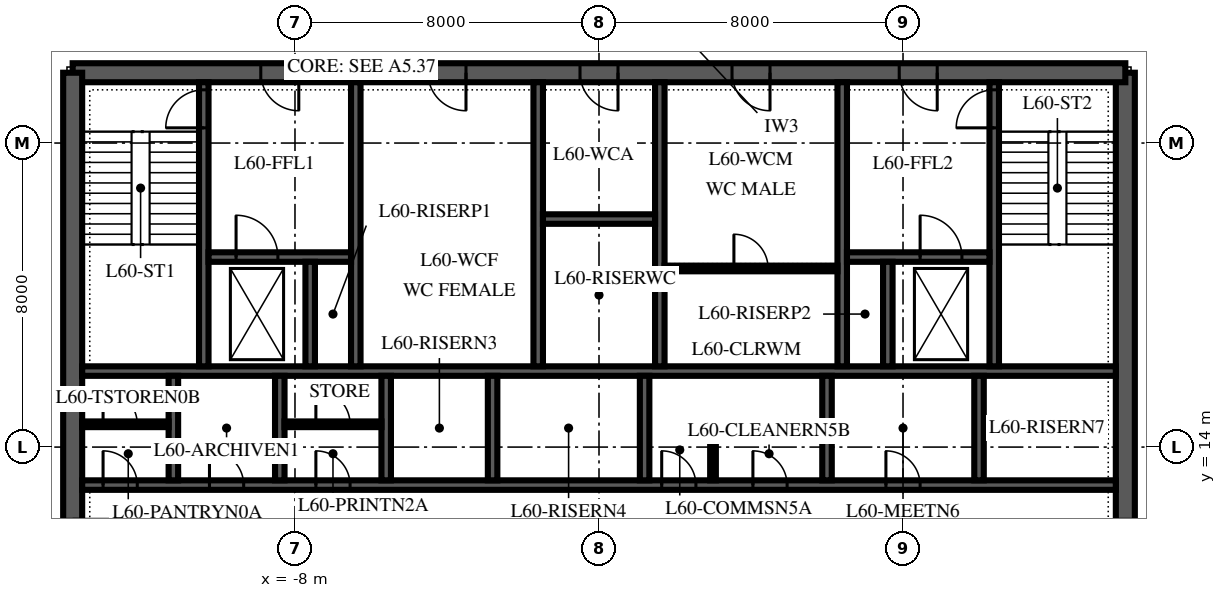
"""IFC4 building model, lengths in metres.
Left out: names, types, materials, properties, quantities, classifications, styles, units other than length and angle.
Written with IfcOpenShell. Run it as: python <this file> out.ifc"""

import sys

from ifc_helpers import new_model, si_unit, direction, frame, frame_2d, origin, place, context, subcontext, project, spatial, polyline, rectangle, outline, extrude, element, fill, save


model = new_model("IFC4")
c1 = context("Model", 3, precision=1e-05, world=origin(), true_north=direction((0.0, 1.0)))
c2 = subcontext(c1, "Body", "Model", "MODEL_VIEW")
j1 = project(units=[si_unit("LENGTHUNIT", "METRE"), si_unit("PLANEANGLEUNIT", "RADIAN")], contexts=[c1])
p1 = place(None, origin())
s1 = spatial("IfcSite", under=j1, at=p1, CompositionType="ELEMENT")
p2 = place(p1, origin())
s2 = spatial("IfcBuilding", under=s1, at=p2, CompositionType="ELEMENT")
p3 = place(p2, frame((0.0, 0.0, 260.0)))
s3 = spatial("IfcBuildingStorey", under=s2, at=p3, CompositionType="ELEMENT", Elevation=260.0)
p4 = place(p3, frame((13.85, 6.15, 0.0), z_axis=(0.0, 0.0, 1.0), x_axis=(0.0, 1.0, 0.0)))
e1 = element("IfcWall", 1, at=p4, inside=s3, PredefinedType="SHEAR", context=c2, shape_type="SweptSolid", body=[
    extrude(outline(polyline([(0.0, -0.25), (17.7, -0.25), (17.7, 0.0), (17.45, 0.0), (17.45, 0.25), (0.25, 0.25), (0.25, 0.0), (0.0, 0.0), (0.0, -0.25)])), origin(), (0.0, 0.0, 1.0), 4.0),
])
p5 = place(p4, frame((4.15, 0.0, 0.0)))
e2 = element("IfcOpeningElement", 2, at=p5, cuts=e1, PredefinedType="OPENING", context=c2, shape_type="SweptSolid", body=[
    extrude(rectangle(XDim=1.8, YDim=2.4, at=frame_2d((0.9, 1.2))), frame((0.0, 0.265, 0.0), z_axis=(0.0, -1.0, 0.0), x_axis=(1.0, 0.0, 0.0)), (0.0, 0.0, 1.0), 0.53),
])
p6 = place(p3, frame((13.85, 23.85, 0.0), z_axis=(0.0, 0.0, 1.0), x_axis=(-1.0, 0.0, 0.0)))
e3 = element("IfcWall", 3, at=p6, inside=s3, PredefinedType="SHEAR", context=c2, shape_type="SweptSolid", body=[
    extrude(rectangle(XDim=27.7, YDim=0.5, at=frame_2d((13.85, 0.0))), origin(), (0.0, 0.0, 1.0), 4.0),
])
p7 = place(p6, frame((21.75, 0.0, 0.0)))
e4 = element("IfcOpeningElement", 4, at=p7, cuts=e3, PredefinedType="OPENING", context=c2, shape_type="SweptSolid", body=[
    extrude(rectangle(XDim=1.0, YDim=2.1, at=frame_2d((0.5, 1.05))), frame((0.0, 0.265, 0.0), z_axis=(0.0, -1.0, 0.0), x_axis=(1.0, 0.0, 0.0)), (0.0, 0.0, 1.0), 0.53),
])
p8 = place(p6, frame((4.95, 0.0, 0.0)))
e5 = element("IfcOpeningElement", 5, at=p8, cuts=e3, PredefinedType="OPENING", context=c2, shape_type="SweptSolid", body=[
    extrude(rectangle(XDim=1.0, YDim=2.1, at=frame_2d((0.5, 1.05))), frame((0.0, 0.265, 0.0), z_axis=(0.0, -1.0, 0.0), x_axis=(1.0, 0.0, 0.0)), (0.0, 0.0, 1.0), 0.53),
])
p9 = place(p6, frame((17.35, 0.0, 0.0)))
e6 = element("IfcOpeningElement", 6, at=p9, cuts=e3, PredefinedType="OPENING", context=c2, shape_type="SweptSolid", body=[
    extrude(rectangle(XDim=1.0, YDim=2.1, at=frame_2d((0.5, 1.05))), frame((0.0, 0.265, 0.0), z_axis=(0.0, -1.0, 0.0), x_axis=(1.0, 0.0, 0.0)), (0.0, 0.0, 1.0), 0.53),
])
p10 = place(p6, frame((13.35, 0.0, 0.0)))
e7 = element("IfcOpeningElement", 7, at=p10, cuts=e3, PredefinedType="OPENING", context=c2, shape_type="SweptSolid", body=[
    extrude(rectangle(XDim=1.0, YDim=2.1, at=frame_2d((0.5, 1.05))), frame((0.0, 0.265, 0.0), z_axis=(0.0, -1.0, 0.0), x_axis=(1.0, 0.0, 0.0)), (0.0, 0.0, 1.0), 0.53),
])
p11 = place(p6, frame((9.35, 0.0, 0.0)))
e8 = element("IfcOpeningElement", 8, at=p11, cuts=e3, PredefinedType="OPENING", context=c2, shape_type="SweptSolid", body=[
    extrude(rectangle(XDim=1.0, YDim=2.1, at=frame_2d((0.5, 1.05))), frame((0.0, 0.265, 0.0), z_axis=(0.0, -1.0, 0.0), x_axis=(1.0, 0.0, 0.0)), (0.0, 0.0, 1.0), 0.53),
])
p12 = place(p3, frame((-13.85, 23.85, 0.0), z_axis=(0.0, 0.0, 1.0), x_axis=(0.0, -1.0, 0.0)))
e9 = element("IfcWall", 9, at=p12, inside=s3, PredefinedType="SHEAR", context=c2, shape_type="SweptSolid", body=[
    extrude(outline(polyline([(0.0, -0.25), (17.7, -0.25), (17.7, 0.0), (17.45, 0.0), (17.45, 0.25), (0.25, 0.25), (0.25, 0.0), (0.0, 0.0), (0.0, -0.25)])), origin(), (0.0, 0.0, 1.0), 4.0),
])
p13 = place(p12, frame((11.75, 0.0, 0.0)))
e10 = element("IfcOpeningElement", 10, at=p13, cuts=e9, PredefinedType="OPENING", context=c2, shape_type="SweptSolid", body=[
    extrude(rectangle(XDim=1.8, YDim=2.4, at=frame_2d((0.9, 1.2))), frame((0.0, 0.265, 0.0), z_axis=(0.0, -1.0, 0.0), x_axis=(1.0, 0.0, 0.0)), (0.0, 0.0, 1.0), 0.53),
])
p14 = place(p3, frame((-13.6, 13.0, 0.0), z_axis=(0.0, 0.0, 1.0), x_axis=(1.0, 0.0, 0.0)))
e11 = element("IfcWall", 11, at=p14, inside=s3, PredefinedType="SHEAR", context=c2, shape_type="SweptSolid", body=[
    extrude(rectangle(XDim=27.2, YDim=0.25, at=frame_2d((13.6, 0.0))), origin(), (0.0, 0.0, 1.0), 4.0),
])
p15 = place(p14, frame((15.25, 0.0, 0.0)))
e12 = element("IfcOpeningElement", 12, at=p15, cuts=e11, PredefinedType="OPENING", context=c2, shape_type="SweptSolid", body=[
    extrude(rectangle(XDim=0.9, YDim=2.1, at=frame_2d((0.45, 1.05))), frame((0.0, 0.14, 0.0), z_axis=(0.0, -1.0, 0.0), x_axis=(1.0, 0.0, 0.0)), (0.0, 0.0, 1.0), 0.28),
])
p16 = place(p14, frame((17.65, 0.0, 0.0)))
e13 = element("IfcOpeningElement", 13, at=p16, cuts=e11, PredefinedType="OPENING", context=c2, shape_type="SweptSolid", body=[
    extrude(rectangle(XDim=0.9, YDim=2.1, at=frame_2d((0.45, 1.05))), frame((0.0, 0.14, 0.0), z_axis=(0.0, -1.0, 0.0), x_axis=(1.0, 0.0, 0.0)), (0.0, 0.0, 1.0), 0.28),
])
p17 = place(p14, frame((21.15, 0.0, 0.0)))
e14 = element("IfcOpeningElement", 14, at=p17, cuts=e11, PredefinedType="OPENING", context=c2, shape_type="SweptSolid", body=[
    extrude(rectangle(XDim=0.9, YDim=2.1, at=frame_2d((0.45, 1.05))), frame((0.0, 0.14, 0.0), z_axis=(0.0, -1.0, 0.0), x_axis=(1.0, 0.0, 0.0)), (0.0, 0.0, 1.0), 0.28),
])
p18 = place(p14, frame((0.55, 0.0, 0.0)))
e15 = element("IfcOpeningElement", 15, at=p18, cuts=e11, PredefinedType="OPENING", context=c2, shape_type="SweptSolid", body=[
    extrude(rectangle(XDim=0.9, YDim=2.1, at=frame_2d((0.45, 1.05))), frame((0.0, 0.14, 0.0), z_axis=(0.0, -1.0, 0.0), x_axis=(1.0, 0.0, 0.0)), (0.0, 0.0, 1.0), 0.28),
])
p19 = place(p14, frame((3.35, 0.0, 0.0)))
e16 = element("IfcOpeningElement", 16, at=p19, cuts=e11, PredefinedType="OPENING", context=c2, shape_type="SweptSolid", body=[
    extrude(rectangle(XDim=0.9, YDim=2.1, at=frame_2d((0.45, 1.05))), frame((0.0, 0.14, 0.0), z_axis=(0.0, -1.0, 0.0), x_axis=(1.0, 0.0, 0.0)), (0.0, 0.0, 1.0), 0.28),
])
p20 = place(p14, frame((6.15, 0.0, 0.0)))
e17 = element("IfcOpeningElement", 17, at=p20, cuts=e11, PredefinedType="OPENING", context=c2, shape_type="SweptSolid", body=[
    extrude(rectangle(XDim=0.9, YDim=2.1, at=frame_2d((0.45, 1.05))), frame((0.0, 0.14, 0.0), z_axis=(0.0, -1.0, 0.0), x_axis=(1.0, 0.0, 0.0)), (0.0, 0.0, 1.0), 0.28),
])
p21 = place(p3, frame((-13.6, 16.0, 0.0), z_axis=(0.0, 0.0, 1.0), x_axis=(1.0, 0.0, 0.0)))
e18 = element("IfcWall", 18, at=p21, inside=s3, PredefinedType="SHEAR", context=c2, shape_type="SweptSolid", body=[
    extrude(rectangle(XDim=27.2, YDim=0.25, at=frame_2d((13.6, 0.0))), origin(), (0.0, 0.0, 1.0), 4.0),
])
for number, where, z_axis, x_axis in (
    (19, (-11.2, 13.125, 0.0), (0.0, 0.0, 1.0), (0.0, 1.0, 0.0)),
    (20, (-8.4, 13.125, 0.0), (0.0, 0.0, 1.0), (0.0, 1.0, 0.0)),
    (21, (-5.6, 13.125, 0.0), (0.0, 0.0, 1.0), (0.0, 1.0, 0.0)),
    (22, (-2.8, 13.125, 0.0), (0.0, 0.0, 1.0), (0.0, 1.0, 0.0)),
    (23, (1.2, 13.125, 0.0), (0.0, 0.0, 1.0), (0.0, 1.0, 0.0)),
    (24, (6.0, 13.125, 0.0), (0.0, 0.0, 1.0), (0.0, 1.0, 0.0)),
    (25, (10.0, 13.125, 0.0), (0.0, 0.0, 1.0), (0.0, 1.0, 0.0)),
):
    element("IfcWall", number, at=place(p3, frame(where, z_axis=z_axis, x_axis=x_axis)), inside=s3, PredefinedType="SHEAR", context=c2, shape_type="SweptSolid", body=[
        extrude(rectangle(XDim=2.75, YDim=0.25, at=frame_2d((1.375, 0.0))), origin(), (0.0, 0.0, 1.0), 4.0),
    ])
p22 = place(p3, frame((-10.4, 16.125, 0.0), z_axis=(0.0, 0.0, 1.0), x_axis=(0.0, 1.0, 0.0)))
e26 = element("IfcWall", 26, at=p22, inside=s3, PredefinedType="SHEAR", context=c2, shape_type="SweptSolid", body=[
    extrude(rectangle(XDim=7.475, YDim=0.25, at=frame_2d((3.738, 0.0))), origin(), (0.0, 0.0, 1.0), 4.0),
])
p23 = place(p22, frame((6.275, 0.0, 0.0)))
e27 = element("IfcOpeningElement", 27, at=p23, cuts=e26, PredefinedType="OPENING", context=c2, shape_type="SweptSolid", body=[
    extrude(rectangle(XDim=1.0, YDim=2.1, at=frame_2d((0.5, 1.05))), frame((0.0, 0.14, 0.0), z_axis=(0.0, -1.0, 0.0), x_axis=(1.0, 0.0, 0.0)), (0.0, 0.0, 1.0), 0.28),
])
for number, where, z_axis, x_axis in (
    (28, (-6.4, 16.125, 0.0), (0.0, 0.0, 1.0), (0.0, 1.0, 0.0)),
    (29, (-1.6, 16.125, 0.0), (0.0, 0.0, 1.0), (0.0, 1.0, 0.0)),
    (30, (1.6, 16.125, 0.0), (0.0, 0.0, 1.0), (0.0, 1.0, 0.0)),
    (31, (6.4, 16.125, 0.0), (0.0, 0.0, 1.0), (0.0, 1.0, 0.0)),
):
    element("IfcWall", number, at=place(p3, frame(where, z_axis=z_axis, x_axis=x_axis)), inside=s3, PredefinedType="SHEAR", context=c2, shape_type="SweptSolid", body=[
        extrude(rectangle(XDim=7.475, YDim=0.25, at=frame_2d((3.738, 0.0))), origin(), (0.0, 0.0, 1.0), 4.0),
    ])
p24 = place(p3, frame((10.4, 16.125, 0.0), z_axis=(0.0, 0.0, 1.0), x_axis=(0.0, 1.0, 0.0)))
e32 = element("IfcWall", 32, at=p24, inside=s3, PredefinedType="SHEAR", context=c2, shape_type="SweptSolid", body=[
    extrude(rectangle(XDim=7.475, YDim=0.25, at=frame_2d((3.738, 0.0))), origin(), (0.0, 0.0, 1.0), 4.0),
])
p25 = place(p24, frame((6.275, 0.0, 0.0)))
e33 = element("IfcOpeningElement", 33, at=p25, cuts=e32, PredefinedType="OPENING", context=c2, shape_type="SweptSolid", body=[
    extrude(rectangle(XDim=1.0, YDim=2.1, at=frame_2d((0.5, 1.05))), frame((0.0, 0.14, 0.0), z_axis=(0.0, -1.0, 0.0), x_axis=(1.0, 0.0, 0.0)), (0.0, 0.0, 1.0), 0.28),
])
p26 = place(p3, frame((-10.275, 19.0, 0.0), z_axis=(0.0, 0.0, 1.0), x_axis=(1.0, 0.0, 0.0)))
e34 = element("IfcWall", 34, at=p26, inside=s3, PredefinedType="SHEAR", context=c2, shape_type="SweptSolid", body=[
    extrude(rectangle(XDim=3.75, YDim=0.25, at=frame_2d((1.875, 0.0))), origin(), (0.0, 0.0, 1.0), 4.0),
])
p27 = place(p26, frame((0.725, 0.0, 0.0)))
e35 = element("IfcOpeningElement", 35, at=p27, cuts=e34, PredefinedType="OPENING", context=c2, shape_type="SweptSolid", body=[
    extrude(rectangle(XDim=1.1, YDim=2.1, at=frame_2d((0.55, 1.05))), frame((0.0, 0.14, 0.0), z_axis=(0.0, -1.0, 0.0), x_axis=(1.0, 0.0, 0.0)), (0.0, 0.0, 1.0), 0.28),
])
p28 = place(p3, frame((6.525, 19.0, 0.0), z_axis=(0.0, 0.0, 1.0), x_axis=(1.0, 0.0, 0.0)))
e36 = element("IfcWall", 36, at=p28, inside=s3, PredefinedType="SHEAR", context=c2, shape_type="SweptSolid", body=[
    extrude(rectangle(XDim=3.75, YDim=0.25, at=frame_2d((1.875, 0.0))), origin(), (0.0, 0.0, 1.0), 4.0),
])
p29 = place(p28, frame((1.925, 0.0, 0.0)))
e37 = element("IfcOpeningElement", 37, at=p29, cuts=e36, PredefinedType="OPENING", context=c2, shape_type="SweptSolid", body=[
    extrude(rectangle(XDim=1.1, YDim=2.1, at=frame_2d((0.55, 1.05))), frame((0.0, 0.14, 0.0), z_axis=(0.0, -1.0, 0.0), x_axis=(1.0, 0.0, 0.0)), (0.0, 0.0, 1.0), 0.28),
])
for number, where, z_axis, x_axis in (
    (38, (-7.6, 16.125, 0.0), (0.0, 0.0, 1.0), (0.0, 1.0, 0.0)),
    (39, (7.6, 16.125, 0.0), (0.0, 0.0, 1.0), (0.0, 1.0, 0.0)),
):
    element("IfcWall", number, at=place(p3, frame(where, z_axis=z_axis, x_axis=x_axis)), inside=s3, PredefinedType="SHEAR", context=c2, shape_type="SweptSolid", body=[
        extrude(rectangle(XDim=2.75, YDim=0.25, at=frame_2d((1.375, 0.0))), origin(), (0.0, 0.0, 1.0), 4.0),
    ])
p30 = place(p3, frame((-1.475, 20.0, 0.0), z_axis=(0.0, 0.0, 1.0), x_axis=(1.0, 0.0, 0.0)))
e40 = element("IfcWall", 40, at=p30, inside=s3, PredefinedType="SHEAR", context=c2, shape_type="SweptSolid", body=[
    extrude(rectangle(XDim=2.95, YDim=0.25, at=frame_2d((1.475, 0.0))), origin(), (0.0, 0.0, 1.0), 4.0),
])
p31 = place(p3, frame((1.725, 18.7, 0.0), z_axis=(0.0, 0.0, 1.0), x_axis=(1.0, 0.0, 0.0)))
e41 = element("IfcWall", 41, at=p31, inside=s3, PredefinedType="PARTITIONING", context=c2, shape_type="SweptSolid", body=[
    extrude(rectangle(XDim=4.55, YDim=0.15, at=frame_2d((2.275, 0.0))), origin(), (0.0, 0.0, 1.0), 3.85),
])
p32 = place(p31, frame((1.825, 0.0, 0.0)))
e42 = element("IfcOpeningElement", 42, at=p32, cuts=e41, PredefinedType="OPENING", context=c2, shape_type="SweptSolid", body=[
    extrude(rectangle(XDim=0.9, YDim=2.1, at=frame_2d((0.45, 1.05))), frame((0.0, 0.09, 0.0), z_axis=(0.0, -1.0, 0.0), x_axis=(1.0, 0.0, 0.0)), (0.0, 0.0, 1.0), 0.18),
])
p33 = place(p3, frame((3.0, 13.125, 0.0), z_axis=(0.0, 0.0, 1.0), x_axis=(0.0, 1.0, 0.0)))
e43 = element("IfcWall", 43, at=p33, inside=s3, PredefinedType="PARTITIONING", context=c2, shape_type="SweptSolid", body=[
    extrude(rectangle(XDim=1.55, YDim=0.15, at=frame_2d((0.775, 0.0))), origin(), (0.0, 0.0, 1.0), 3.85),
])
p34 = place(p3, frame((3.075, 14.6, 0.0), z_axis=(0.0, 0.0, 1.0), x_axis=(1.0, 0.0, 0.0)))
e44 = element("IfcWall", 44, at=p34, inside=s3, PredefinedType="PARTITIONING", context=c2, shape_type="SweptSolid", body=[
    extrude(rectangle(XDim=2.8, YDim=0.15, at=frame_2d((1.4, 0.0))), origin(), (0.0, 0.0, 1.0), 3.85),
])
p35 = place(p3, frame((-13.6, 14.6, 0.0), z_axis=(0.0, 0.0, 1.0), x_axis=(1.0, 0.0, 0.0)))
e45 = element("IfcWall", 45, at=p35, inside=s3, PredefinedType="PARTITIONING", context=c2, shape_type="SweptSolid", body=[
    extrude(rectangle(XDim=2.275, YDim=0.15, at=frame_2d((1.138, 0.0))), origin(), (0.0, 0.0, 1.0), 3.85),
])
p36 = place(p35, frame((0.55, 0.0, 0.0)))
e46 = element("IfcOpeningElement", 46, at=p36, cuts=e45, PredefinedType="OPENING", context=c2, shape_type="SweptSolid", body=[
    extrude(rectangle(XDim=0.9, YDim=2.1, at=frame_2d((0.45, 1.05))), frame((0.0, 0.09, 0.0), z_axis=(0.0, -1.0, 0.0), x_axis=(1.0, 0.0, 0.0)), (0.0, 0.0, 1.0), 0.18),
])
p37 = place(p3, frame((-8.275, 14.6, 0.0), z_axis=(0.0, 0.0, 1.0), x_axis=(1.0, 0.0, 0.0)))
e47 = element("IfcWall", 47, at=p37, inside=s3, PredefinedType="PARTITIONING", context=c2, shape_type="SweptSolid", body=[
    extrude(rectangle(XDim=2.55, YDim=0.15, at=frame_2d((1.275, 0.0))), origin(), (0.0, 0.0, 1.0), 3.85),
])
p38 = place(p37, frame((0.825, 0.0, 0.0)))
e48 = element("IfcOpeningElement", 48, at=p38, cuts=e47, PredefinedType="OPENING", context=c2, shape_type="SweptSolid", body=[
    extrude(rectangle(XDim=0.9, YDim=2.1, at=frame_2d((0.45, 1.05))), frame((0.0, 0.09, 0.0), z_axis=(0.0, -1.0, 0.0), x_axis=(1.0, 0.0, 0.0)), (0.0, 0.0, 1.0), 0.18),
])
p39 = place(p7, origin())
e49 = element("IfcDoor", 49, at=p39, inside=s3, OperationType="SINGLE_SWING_RIGHT", PredefinedType="DOOR", context=c2, shape_type="SweptSolid", body=[
    extrude(rectangle(XDim=1.0, YDim=2.1, at=frame_2d((0.5, 1.05))), frame((0.0, 0.25, 0.0), z_axis=(0.0, -1.0, 0.0), x_axis=(1.0, 0.0, 0.0)), (0.0, 0.0, 1.0), 0.5),
])
fill(e4, e49)
p40 = place(p8, origin())
e50 = element("IfcDoor", 50, at=p40, inside=s3, OperationType="SINGLE_SWING_RIGHT", PredefinedType="DOOR", context=c2, shape_type="SweptSolid", body=[
    extrude(rectangle(XDim=1.0, YDim=2.1, at=frame_2d((0.5, 1.05))), frame((0.0, 0.25, 0.0), z_axis=(0.0, -1.0, 0.0), x_axis=(1.0, 0.0, 0.0)), (0.0, 0.0, 1.0), 0.5),
])
fill(e5, e50)
p41 = place(p9, origin())
e51 = element("IfcDoor", 51, at=p41, inside=s3, OperationType="SINGLE_SWING_LEFT", PredefinedType="DOOR", context=c2, shape_type="SweptSolid", body=[
    extrude(rectangle(XDim=1.0, YDim=2.1, at=frame_2d((0.5, 1.05))), frame((0.0, 0.25, 0.0), z_axis=(0.0, -1.0, 0.0), x_axis=(1.0, 0.0, 0.0)), (0.0, 0.0, 1.0), 0.5),
])
fill(e6, e51)
p42 = place(p10, origin())
e52 = element("IfcDoor", 52, at=p42, inside=s3, OperationType="SINGLE_SWING_LEFT", PredefinedType="DOOR", context=c2, shape_type="SweptSolid", body=[
    extrude(rectangle(XDim=1.0, YDim=2.1, at=frame_2d((0.5, 1.05))), frame((0.0, 0.25, 0.0), z_axis=(0.0, -1.0, 0.0), x_axis=(1.0, 0.0, 0.0)), (0.0, 0.0, 1.0), 0.5),
])
fill(e7, e52)
p43 = place(p11, origin())
e53 = element("IfcDoor", 53, at=p43, inside=s3, OperationType="SINGLE_SWING_LEFT", PredefinedType="DOOR", context=c2, shape_type="SweptSolid", body=[
    extrude(rectangle(XDim=1.0, YDim=2.1, at=frame_2d((0.5, 1.05))), frame((0.0, 0.25, 0.0), z_axis=(0.0, -1.0, 0.0), x_axis=(1.0, 0.0, 0.0)), (0.0, 0.0, 1.0), 0.5),
])
fill(e8, e53)
p44 = place(p23, origin())
e54 = element("IfcDoor", 54, at=p44, inside=s3, OperationType="SINGLE_SWING_LEFT", PredefinedType="DOOR", context=c2, shape_type="SweptSolid", body=[
    extrude(rectangle(XDim=1.0, YDim=2.1, at=frame_2d((0.5, 1.05))), frame((0.0, 0.125, 0.0), z_axis=(0.0, -1.0, 0.0), x_axis=(1.0, 0.0, 0.0)), (0.0, 0.0, 1.0), 0.25),
])
fill(e27, e54)
p45 = place(p25, origin())
e55 = element("IfcDoor", 55, at=p45, inside=s3, OperationType="SINGLE_SWING_LEFT", PredefinedType="DOOR", context=c2, shape_type="SweptSolid", body=[
    extrude(rectangle(XDim=1.0, YDim=2.1, at=frame_2d((0.5, 1.05))), frame((0.0, 0.125, 0.0), z_axis=(0.0, -1.0, 0.0), x_axis=(1.0, 0.0, 0.0)), (0.0, 0.0, 1.0), 0.25),
])
fill(e33, e55)
p46 = place(p29, origin())
e56 = element("IfcDoor", 56, at=p46, inside=s3, OperationType="SLIDING_TO_RIGHT", PredefinedType="DOOR", context=c2, shape_type="SweptSolid", body=[
    extrude(rectangle(XDim=1.1, YDim=2.1, at=frame_2d((0.55, 1.05))), frame((0.0, 0.125, 0.0), z_axis=(0.0, -1.0, 0.0), x_axis=(1.0, 0.0, 0.0)), (0.0, 0.0, 1.0), 0.25),
])
fill(e37, e56)
p47 = place(p27, origin())
e57 = element("IfcDoor", 57, at=p47, inside=s3, OperationType="SLIDING_TO_RIGHT", PredefinedType="DOOR", context=c2, shape_type="SweptSolid", body=[
    extrude(rectangle(XDim=1.1, YDim=2.1, at=frame_2d((0.55, 1.05))), frame((0.0, 0.125, 0.0), z_axis=(0.0, -1.0, 0.0), x_axis=(1.0, 0.0, 0.0)), (0.0, 0.0, 1.0), 0.25),
])
fill(e35, e57)
p48 = place(p15, origin())
e58 = element("IfcDoor", 58, at=p48, inside=s3, OperationType="SINGLE_SWING_LEFT", PredefinedType="DOOR", context=c2, shape_type="SweptSolid", body=[
    extrude(rectangle(XDim=0.9, YDim=2.1, at=frame_2d((0.45, 1.05))), frame((0.0, 0.125, 0.0), z_axis=(0.0, -1.0, 0.0), x_axis=(1.0, 0.0, 0.0)), (0.0, 0.0, 1.0), 0.25),
])
fill(e12, e58)
p49 = place(p16, origin())
e59 = element("IfcDoor", 59, at=p49, inside=s3, OperationType="SINGLE_SWING_LEFT", PredefinedType="DOOR", context=c2, shape_type="SweptSolid", body=[
    extrude(rectangle(XDim=0.9, YDim=2.1, at=frame_2d((0.45, 1.05))), frame((0.0, 0.125, 0.0), z_axis=(0.0, -1.0, 0.0), x_axis=(1.0, 0.0, 0.0)), (0.0, 0.0, 1.0), 0.25),
])
fill(e13, e59)
p50 = place(p17, origin())
e60 = element("IfcDoor", 60, at=p50, inside=s3, OperationType="SINGLE_SWING_LEFT", PredefinedType="DOOR", context=c2, shape_type="SweptSolid", body=[
    extrude(rectangle(XDim=0.9, YDim=2.1, at=frame_2d((0.45, 1.05))), frame((0.0, 0.125, 0.0), z_axis=(0.0, -1.0, 0.0), x_axis=(1.0, 0.0, 0.0)), (0.0, 0.0, 1.0), 0.25),
])
fill(e14, e60)
p51 = place(p18, origin())
e61 = element("IfcDoor", 61, at=p51, inside=s3, OperationType="SINGLE_SWING_LEFT", PredefinedType="DOOR", context=c2, shape_type="SweptSolid", body=[
    extrude(rectangle(XDim=0.9, YDim=2.1, at=frame_2d((0.45, 1.05))), frame((0.0, 0.125, 0.0), z_axis=(0.0, -1.0, 0.0), x_axis=(1.0, 0.0, 0.0)), (0.0, 0.0, 1.0), 0.25),
])
fill(e15, e61)
p52 = place(p36, origin())
e62 = element("IfcDoor", 62, at=p52, inside=s3, OperationType="SINGLE_SWING_LEFT", PredefinedType="DOOR", context=c2, shape_type="SweptSolid", body=[
    extrude(rectangle(XDim=0.9, YDim=2.1, at=frame_2d((0.45, 1.05))), frame((0.0, 0.075, 0.0), z_axis=(0.0, -1.0, 0.0), x_axis=(1.0, 0.0, 0.0)), (0.0, 0.0, 1.0), 0.149),
])
fill(e46, e62)
p53 = place(p19, origin())
e63 = element("IfcDoor", 63, at=p53, inside=s3, OperationType="SINGLE_SWING_LEFT", PredefinedType="DOOR", context=c2, shape_type="SweptSolid", body=[
    extrude(rectangle(XDim=0.9, YDim=2.1, at=frame_2d((0.45, 1.05))), frame((0.0, 0.125, 0.0), z_axis=(0.0, -1.0, 0.0), x_axis=(1.0, 0.0, 0.0)), (0.0, 0.0, 1.0), 0.25),
])
fill(e16, e63)
p54 = place(p20, origin())
e64 = element("IfcDoor", 64, at=p54, inside=s3, OperationType="SINGLE_SWING_LEFT", PredefinedType="DOOR", context=c2, shape_type="SweptSolid", body=[
    extrude(rectangle(XDim=0.9, YDim=2.1, at=frame_2d((0.45, 1.05))), frame((0.0, 0.125, 0.0), z_axis=(0.0, -1.0, 0.0), x_axis=(1.0, 0.0, 0.0)), (0.0, 0.0, 1.0), 0.25),
])
fill(e17, e64)
p55 = place(p38, origin())
e65 = element("IfcDoor", 65, at=p55, inside=s3, OperationType="SINGLE_SWING_LEFT", PredefinedType="DOOR", context=c2, shape_type="SweptSolid", body=[
    extrude(rectangle(XDim=0.9, YDim=2.1, at=frame_2d((0.45, 1.05))), frame((0.0, 0.075, 0.0), z_axis=(0.0, -1.0, 0.0), x_axis=(1.0, 0.0, 0.0)), (0.0, 0.0, 1.0), 0.149),
])
fill(e48, e65)
p56 = place(p32, origin())
e66 = element("IfcDoor", 66, at=p56, inside=s3, OperationType="SINGLE_SWING_LEFT", PredefinedType="DOOR", context=c2, shape_type="SweptSolid", body=[
    extrude(rectangle(XDim=0.9, YDim=2.1, at=frame_2d((0.45, 1.05))), frame((0.0, 0.075, 0.0), z_axis=(0.0, -1.0, 0.0), x_axis=(1.0, 0.0, 0.0)), (0.0, 0.0, 1.0), 0.149),
])
fill(e42, e66)
save(model, sys.argv[1])
